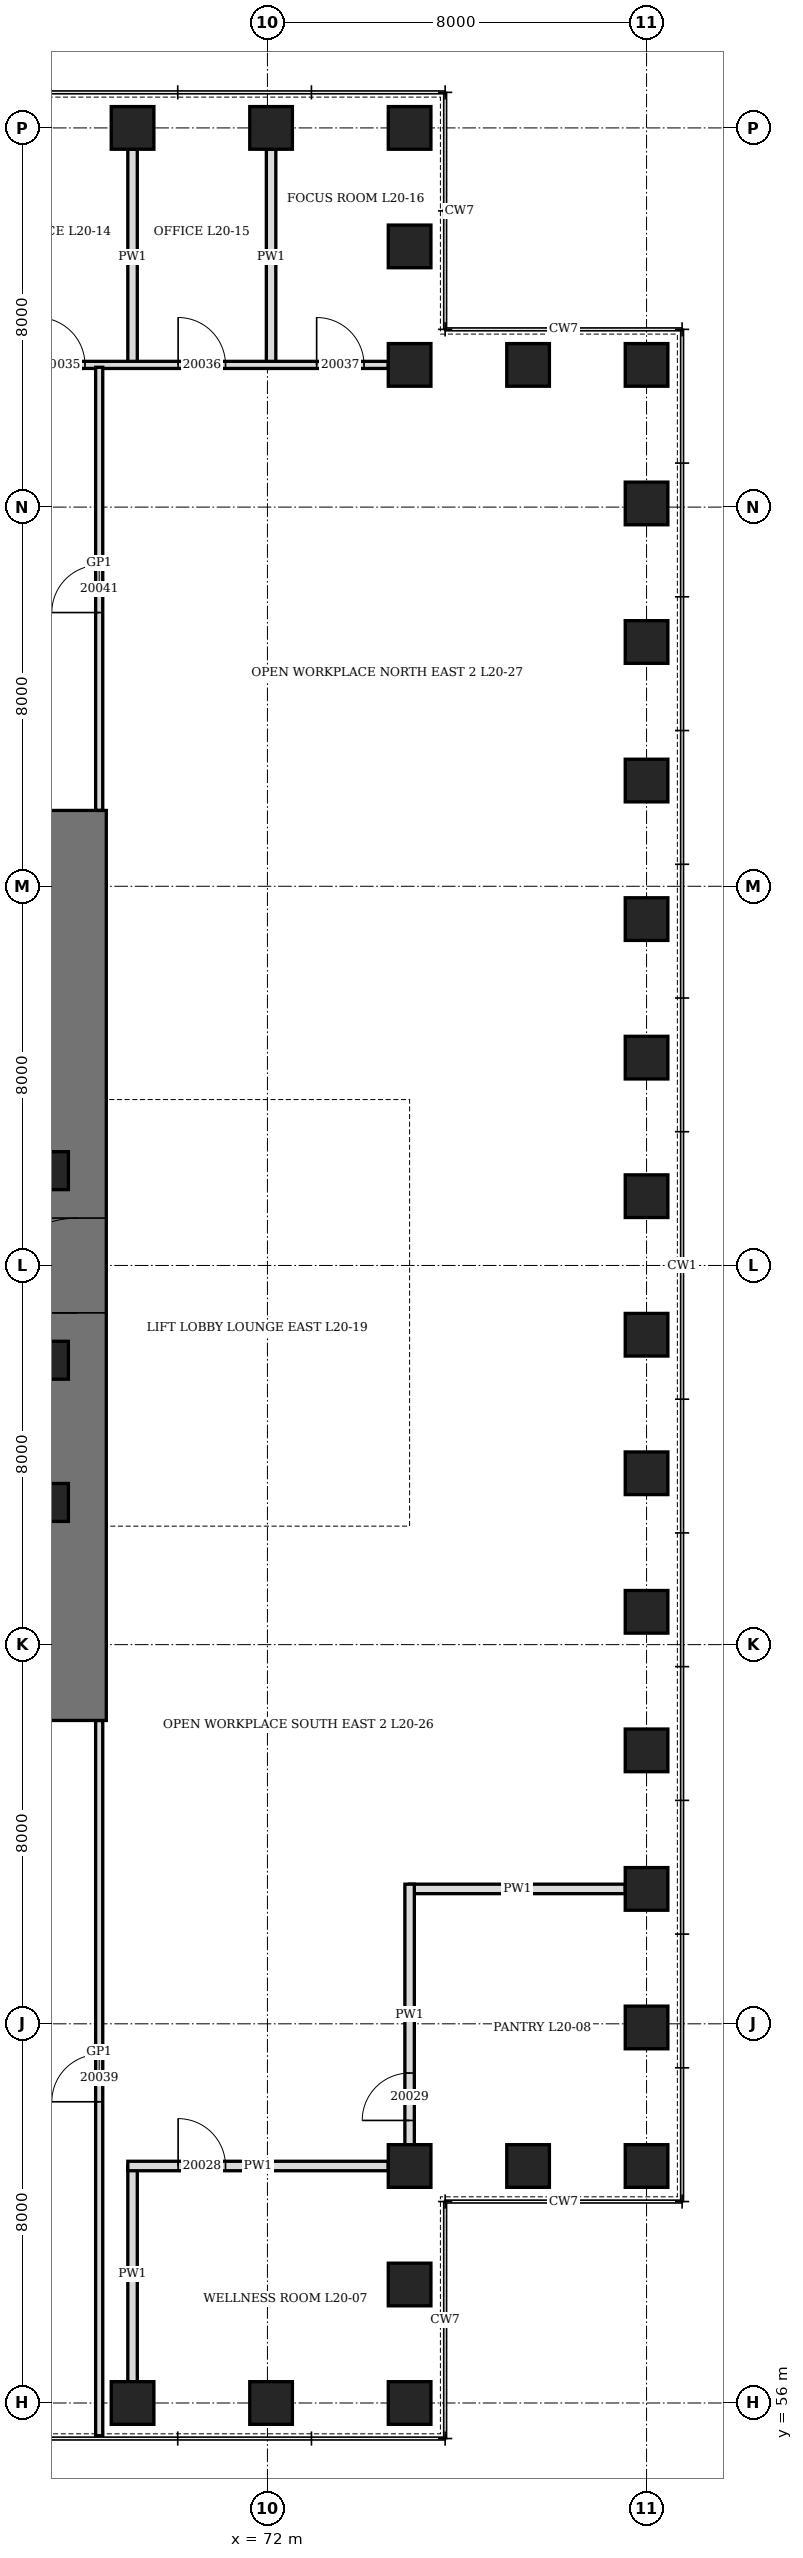
"""IFC4 building model, lengths in metres.
Left out: names, types, materials, properties, quantities, classifications, styles, units other than length and angle.
Written with IfcOpenShell. Run it as: python <this file> out.ifc"""

import sys

from ifc_helpers import new_model, si_unit, direction, frame, frame_2d, origin, origin_2d, place, context, subcontext, project, spatial, rectangle, hollow_rectangle, extrude, element, fill, save


model = new_model("IFC4")
c1 = context("Model", 3, precision=1e-05, world=origin(), true_north=direction((0.0, 1.0)))
c2 = subcontext(c1, "Body", "Model", "MODEL_VIEW")
j1 = project(units=[si_unit("LENGTHUNIT", "METRE"), si_unit("PLANEANGLEUNIT", "RADIAN")], contexts=[c1])
p1 = place(None, origin())
s1 = spatial("IfcSite", under=j1, at=p1, CompositionType="ELEMENT")
p2 = place(p1, origin())
s2 = spatial("IfcBuilding", under=s1, at=p2, CompositionType="ELEMENT")
p3 = place(p2, frame((0.0, 0.0, 93.7)))
s3 = spatial("IfcBuildingStorey", under=s2, at=p3, CompositionType="ELEMENT", Elevation=93.7)
for number, where, z_axis, x_axis in (
    (1, (69.154, 56.0, 0.0), (0.0, 0.0, 1.0), (1.0, 0.0, 0.0)),
    (2, (72.077, 56.0, 0.0), (0.0, 0.0, 1.0), (1.0, 0.0, 0.0)),
    (3, (75.0, 56.0, 0.0), (0.0, 0.0, 1.0), (0.0, 1.0, 0.0)),
    (4, (75.0, 58.5, 0.0), (0.0, 0.0, 1.0), (0.0, 1.0, 0.0)),
    (5, (75.0, 61.0, 0.0), (0.0, 0.0, 1.0), (1.0, 0.0, 0.0)),
    (6, (77.5, 61.0, 0.0), (0.0, 0.0, 1.0), (1.0, 0.0, 0.0)),
    (7, (80.0, 61.0, 0.0), (0.0, 0.0, 1.0), (0.0, 1.0, 0.0)),
    (8, (80.0, 63.923, 0.0), (0.0, 0.0, 1.0), (0.0, 1.0, 0.0)),
    (9, (80.0, 66.846, 0.0), (0.0, 0.0, 1.0), (0.0, 1.0, 0.0)),
    (10, (80.0, 69.769, 0.0), (0.0, 0.0, 1.0), (0.0, 1.0, 0.0)),
    (11, (80.0, 72.692, 0.0), (0.0, 0.0, 1.0), (0.0, 1.0, 0.0)),
    (12, (80.0, 75.615, 0.0), (0.0, 0.0, 1.0), (0.0, 1.0, 0.0)),
    (13, (80.0, 78.539, 0.0), (0.0, 0.0, 1.0), (0.0, 1.0, 0.0)),
    (14, (80.0, 81.461, 0.0), (0.0, 0.0, 1.0), (0.0, 1.0, 0.0)),
    (15, (80.0, 84.385, 0.0), (0.0, 0.0, 1.0), (0.0, 1.0, 0.0)),
    (16, (80.0, 87.308, 0.0), (0.0, 0.0, 1.0), (0.0, 1.0, 0.0)),
    (17, (80.0, 90.231, 0.0), (0.0, 0.0, 1.0), (0.0, 1.0, 0.0)),
    (18, (80.0, 93.154, 0.0), (0.0, 0.0, 1.0), (0.0, 1.0, 0.0)),
    (19, (80.0, 96.077, 0.0), (0.0, 0.0, 1.0), (0.0, 1.0, 0.0)),
    (20, (80.0, 99.0, 0.0), (0.0, 0.0, 1.0), (1.0, 0.0, 0.0)),
    (21, (77.5, 99.0, 0.0), (0.0, 0.0, 1.0), (1.0, 0.0, 0.0)),
    (22, (75.0, 99.0, 0.0), (0.0, 0.0, 1.0), (0.0, 1.0, 0.0)),
    (23, (75.0, 101.5, 0.0), (0.0, 0.0, 1.0), (0.0, 1.0, 0.0)),
    (24, (75.0, 104.0, 0.0), (0.0, 0.0, 1.0), (1.0, 0.0, 0.0)),
    (25, (72.077, 104.0, 0.0), (0.0, 0.0, 1.0), (1.0, 0.0, 0.0)),
    (26, (69.154, 104.0, 0.0), (0.0, 0.0, 1.0), (1.0, 0.0, 0.0)),
):
    element("IfcColumn", number, at=place(p3, frame(where, z_axis=z_axis, x_axis=x_axis)), inside=s3, PredefinedType="COLUMN", context=c2, shape_type="SweptSolid", body=[
        extrude(hollow_rectangle(XDim=0.9, YDim=0.9, WallThickness=0.12, at=origin_2d()), origin(), (0.0, 0.0, 1.0), 4.2),
    ])
p4 = place(p3, frame((68.0, 70.4, 0.0), z_axis=(0.0, 0.0, 1.0), x_axis=(0.0, 1.0, 0.0)))
e27 = element("IfcWall", 27, at=p4, inside=s3, PredefinedType="SHEAR", context=c2, shape_type="SweptSolid", body=[
    extrude(rectangle(XDim=19.2, YDim=1.2, at=frame_2d((9.6, 0.0))), origin(), (0.0, 0.0, 1.0), 4.2),
])
p5 = place(p4, frame((8.6, 0.0, 0.0)))
e28 = element("IfcOpeningElement", 28, at=p5, cuts=e27, PredefinedType="OPENING", context=c2, shape_type="SweptSolid", body=[
    extrude(rectangle(XDim=2.0, YDim=2.4, at=frame_2d((1.0, 1.2))), frame((0.0, 0.61, 0.0), z_axis=(0.0, -1.0, 0.0), x_axis=(1.0, 0.0, 0.0)), (0.0, 0.0, 1.0), 1.22),
])
for number, where, z_axis, x_axis in (
    (29, (67.4, 75.0, 0.0), (0.0, 0.0, 1.0), (1.0, 0.0, 0.0)),
    (30, (67.4, 78.0, 0.0), (0.0, 0.0, 1.0), (1.0, 0.0, 0.0)),
    (31, (67.4, 82.0, 0.0), (0.0, 0.0, 1.0), (1.0, 0.0, 0.0)),
):
    element("IfcColumn", number, at=place(p3, frame(where, z_axis=z_axis, x_axis=x_axis)), inside=s3, PredefinedType="COLUMN", context=c2, shape_type="SweptSolid", body=[
        extrude(hollow_rectangle(XDim=0.8, YDim=0.8, WallThickness=0.1, at=origin_2d()), origin(), (0.0, 0.0, 1.0), 4.2),
    ])
p6 = place(p3, frame((69.154, 56.45, 0.0), z_axis=(0.0, 0.0, 1.0), x_axis=(0.0, 1.0, 0.0)))
e32 = element("IfcWall", 32, at=p6, inside=s3, PredefinedType="PARTITIONING", context=c2, shape_type="SweptSolid", body=[
    extrude(rectangle(XDim=4.55, YDim=0.2, at=frame_2d((2.275, 0.0))), origin(), (0.0, 0.0, 1.0), 3.278),
])
p7 = place(p3, frame((75.0, 66.846, 0.0), z_axis=(0.0, 0.0, 1.0), x_axis=(1.0, 0.0, 0.0)))
e33 = element("IfcWall", 33, at=p7, inside=s3, PredefinedType="PARTITIONING", context=c2, shape_type="SweptSolid", body=[
    extrude(rectangle(XDim=4.55, YDim=0.2, at=frame_2d((2.275, 0.0))), origin(), (0.0, 0.0, 1.0), 3.428),
])
p8 = place(p3, frame((69.154, 99.0, 0.0), z_axis=(0.0, 0.0, 1.0), x_axis=(0.0, 1.0, 0.0)))
e34 = element("IfcWall", 34, at=p8, inside=s3, PredefinedType="PARTITIONING", context=c2, shape_type="SweptSolid", body=[
    extrude(rectangle(XDim=4.55, YDim=0.2, at=frame_2d((2.275, 0.0))), origin(), (0.0, 0.0, 1.0), 3.278),
])
p9 = place(p3, frame((72.077, 99.0, 0.0), z_axis=(0.0, 0.0, 1.0), x_axis=(0.0, 1.0, 0.0)))
e35 = element("IfcWall", 35, at=p9, inside=s3, PredefinedType="PARTITIONING", context=c2, shape_type="SweptSolid", body=[
    extrude(rectangle(XDim=4.55, YDim=0.2, at=frame_2d((2.275, 0.0))), origin(), (0.0, 0.0, 1.0), 3.428),
])
p10 = place(p3, frame((69.054, 61.0, 0.0), z_axis=(0.0, 0.0, 1.0), x_axis=(1.0, 0.0, 0.0)))
e36 = element("IfcWall", 36, at=p10, inside=s3, PredefinedType="PARTITIONING", context=c2, shape_type="SweptSolid", body=[
    extrude(rectangle(XDim=5.496, YDim=0.2, at=frame_2d((2.748, 0.0))), origin(), (0.0, 0.0, 1.0), 4.04),
])
p11 = place(p10, frame((1.062, 0.0, 0.0)))
e37 = element("IfcOpeningElement", 37, at=p11, cuts=e36, PredefinedType="OPENING", context=c2, shape_type="SweptSolid", body=[
    extrude(rectangle(XDim=1.0, YDim=2.1, at=frame_2d((0.5, 1.05))), frame((0.0, 0.11, 0.0), z_axis=(0.0, -1.0, 0.0), x_axis=(1.0, 0.0, 0.0)), (0.0, 0.0, 1.0), 0.22),
])
p12 = place(p3, frame((57.362, 99.0, 0.0), z_axis=(0.0, 0.0, 1.0), x_axis=(1.0, 0.0, 0.0)))
e38 = element("IfcWall", 38, at=p12, inside=s3, PredefinedType="PARTITIONING", context=c2, shape_type="SweptSolid", body=[
    extrude(rectangle(XDim=17.188, YDim=0.15, at=frame_2d((8.594, 0.0))), origin(), (0.0, 0.0, 1.0), 4.04),
])
p13 = place(p12, frame((1.062, 0.0, 0.0)))
e39 = element("IfcOpeningElement", 39, at=p13, cuts=e38, PredefinedType="OPENING", context=c2, shape_type="SweptSolid", body=[
    extrude(rectangle(XDim=1.0, YDim=2.1, at=frame_2d((0.5, 1.05))), frame((0.0, 0.085, 0.0), z_axis=(0.0, -1.0, 0.0), x_axis=(1.0, 0.0, 0.0)), (0.0, 0.0, 1.0), 0.17),
])
p14 = place(p12, frame((3.985, 0.0, 0.0)))
e40 = element("IfcOpeningElement", 40, at=p14, cuts=e38, PredefinedType="OPENING", context=c2, shape_type="SweptSolid", body=[
    extrude(rectangle(XDim=1.0, YDim=2.1, at=frame_2d((0.5, 1.05))), frame((0.0, 0.085, 0.0), z_axis=(0.0, -1.0, 0.0), x_axis=(1.0, 0.0, 0.0)), (0.0, 0.0, 1.0), 0.17),
])
p15 = place(p12, frame((6.908, 0.0, 0.0)))
e41 = element("IfcOpeningElement", 41, at=p15, cuts=e38, PredefinedType="OPENING", context=c2, shape_type="SweptSolid", body=[
    extrude(rectangle(XDim=1.0, YDim=2.1, at=frame_2d((0.5, 1.05))), frame((0.0, 0.085, 0.0), z_axis=(0.0, -1.0, 0.0), x_axis=(1.0, 0.0, 0.0)), (0.0, 0.0, 1.0), 0.17),
])
p16 = place(p12, frame((9.789, 0.0, 0.0)))
e42 = element("IfcOpeningElement", 42, at=p16, cuts=e38, PredefinedType="OPENING", context=c2, shape_type="SweptSolid", body=[
    extrude(rectangle(XDim=1.0, YDim=2.1, at=frame_2d((0.5, 1.05))), frame((0.0, 0.085, 0.0), z_axis=(0.0, -1.0, 0.0), x_axis=(1.0, 0.0, 0.0)), (0.0, 0.0, 1.0), 0.17),
])
p17 = place(p12, frame((12.754, 0.0, 0.0)))
e43 = element("IfcOpeningElement", 43, at=p17, cuts=e38, PredefinedType="OPENING", context=c2, shape_type="SweptSolid", body=[
    extrude(rectangle(XDim=1.0, YDim=2.1, at=frame_2d((0.5, 1.05))), frame((0.0, 0.085, 0.0), z_axis=(0.0, -1.0, 0.0), x_axis=(1.0, 0.0, 0.0)), (0.0, 0.0, 1.0), 0.17),
])
p18 = place(p12, frame((15.677, 0.0, 0.0)))
e44 = element("IfcOpeningElement", 44, at=p18, cuts=e38, PredefinedType="OPENING", context=c2, shape_type="SweptSolid", body=[
    extrude(rectangle(XDim=1.0, YDim=2.4, at=frame_2d((0.5, 1.2))), frame((0.0, 0.085, 0.0), z_axis=(0.0, -1.0, 0.0), x_axis=(1.0, 0.0, 0.0)), (0.0, 0.0, 1.0), 0.17),
])
p19 = place(p3, frame((68.45, 55.31, 0.0), z_axis=(0.0, 0.0, 1.0), x_axis=(0.0, 1.0, 0.0)))
e45 = element("IfcWall", 45, at=p19, inside=s3, PredefinedType="PARTITIONING", context=c2, shape_type="SweptSolid", body=[
    extrude(rectangle(XDim=15.09, YDim=0.15, at=frame_2d((7.545, 0.0))), origin(), (0.0, 0.0, 1.0), 4.04),
])
p20 = place(p19, frame((7.045, 0.0, 0.0)))
e46 = element("IfcOpeningElement", 46, at=p20, cuts=e45, PredefinedType="OPENING", context=c2, shape_type="SweptSolid", body=[
    extrude(rectangle(XDim=1.0, YDim=2.4, at=frame_2d((0.5, 1.2))), frame((0.0, 0.085, 0.0), z_axis=(0.0, -1.0, 0.0), x_axis=(1.0, 0.0, 0.0)), (0.0, 0.0, 1.0), 0.17),
])
p21 = place(p3, frame((68.45, 89.6, 0.0), z_axis=(0.0, 0.0, 1.0), x_axis=(0.0, 1.0, 0.0)))
e47 = element("IfcWall", 47, at=p21, inside=s3, PredefinedType="PARTITIONING", context=c2, shape_type="SweptSolid", body=[
    extrude(rectangle(XDim=9.35, YDim=0.15, at=frame_2d((4.675, 0.0))), origin(), (0.0, 0.0, 1.0), 4.04),
])
p22 = place(p21, frame((4.175, 0.0, 0.0)))
e48 = element("IfcOpeningElement", 48, at=p22, cuts=e47, PredefinedType="OPENING", context=c2, shape_type="SweptSolid", body=[
    extrude(rectangle(XDim=1.0, YDim=2.4, at=frame_2d((0.5, 1.2))), frame((0.0, 0.085, 0.0), z_axis=(0.0, -1.0, 0.0), x_axis=(1.0, 0.0, 0.0)), (0.0, 0.0, 1.0), 0.17),
])
p23 = place(p3, frame((75.0, 61.45, 0.0), z_axis=(0.0, 0.0, 1.0), x_axis=(0.0, 1.0, 0.0)))
e49 = element("IfcWall", 49, at=p23, inside=s3, PredefinedType="PARTITIONING", context=c2, shape_type="SweptSolid", body=[
    extrude(rectangle(XDim=5.496, YDim=0.2, at=frame_2d((2.748, 0.0))), origin(), (0.0, 0.0, 1.0), 4.04),
])
p24 = place(p23, frame((0.511, 0.0, 0.0)))
e50 = element("IfcOpeningElement", 50, at=p24, cuts=e49, PredefinedType="OPENING", context=c2, shape_type="SweptSolid", body=[
    extrude(rectangle(XDim=1.0, YDim=2.1, at=frame_2d((0.5, 1.05))), frame((0.0, 0.11, 0.0), z_axis=(0.0, -1.0, 0.0), x_axis=(1.0, 0.0, 0.0)), (0.0, 0.0, 1.0), 0.22),
])
p25 = place(p5, origin())
e51 = element("IfcDoor", 51, at=p25, inside=s3, OperationType="DOUBLE_DOOR_SINGLE_SWING", PredefinedType="DOOR", context=c2, shape_type="SweptSolid", body=[
    extrude(rectangle(XDim=2.0, YDim=2.4, at=frame_2d((1.0, 1.2))), frame((0.0, 0.35, 0.0), z_axis=(0.0, -1.0, 0.0), x_axis=(1.0, 0.0, 0.0)), (0.0, 0.0, 1.0), 0.7),
])
fill(e28, e51)
p26 = place(p11, origin())
e52 = element("IfcDoor", 52, at=p26, inside=s3, OperationType="SINGLE_SWING_LEFT", PredefinedType="DOOR", context=c2, shape_type="SweptSolid", body=[
    extrude(rectangle(XDim=1.0, YDim=2.1, at=frame_2d((0.5, 1.05))), frame((0.0, 0.1, 0.0), z_axis=(0.0, -1.0, 0.0), x_axis=(1.0, 0.0, 0.0)), (0.0, 0.0, 1.0), 0.199),
])
fill(e37, e52)
p27 = place(p24, origin())
e53 = element("IfcDoor", 53, at=p27, inside=s3, OperationType="SINGLE_SWING_LEFT", PredefinedType="DOOR", context=c2, shape_type="SweptSolid", body=[
    extrude(rectangle(XDim=1.0, YDim=2.1, at=frame_2d((0.5, 1.05))), frame((0.0, 0.1, 0.0), z_axis=(0.0, -1.0, 0.0), x_axis=(1.0, 0.0, 0.0)), (0.0, 0.0, 1.0), 0.199),
])
fill(e50, e53)
p28 = place(p16, origin())
e54 = element("IfcDoor", 54, at=p28, inside=s3, OperationType="SINGLE_SWING_LEFT", PredefinedType="DOOR", context=c2, shape_type="SweptSolid", body=[
    extrude(rectangle(XDim=1.0, YDim=2.1, at=frame_2d((0.5, 1.05))), frame((0.0, 0.075, 0.0), z_axis=(0.0, -1.0, 0.0), x_axis=(1.0, 0.0, 0.0)), (0.0, 0.0, 1.0), 0.149),
])
fill(e42, e54)
p29 = place(p17, origin())
e55 = element("IfcDoor", 55, at=p29, inside=s3, OperationType="SINGLE_SWING_LEFT", PredefinedType="DOOR", context=c2, shape_type="SweptSolid", body=[
    extrude(rectangle(XDim=1.0, YDim=2.1, at=frame_2d((0.5, 1.05))), frame((0.0, 0.075, 0.0), z_axis=(0.0, -1.0, 0.0), x_axis=(1.0, 0.0, 0.0)), (0.0, 0.0, 1.0), 0.149),
])
fill(e43, e55)
p30 = place(p18, origin())
e56 = element("IfcDoor", 56, at=p30, inside=s3, OperationType="SINGLE_SWING_RIGHT", PredefinedType="DOOR", context=c2, shape_type="SweptSolid", body=[
    extrude(rectangle(XDim=1.0, YDim=2.4, at=frame_2d((0.5, 1.2))), frame((0.0, 0.075, 0.0), z_axis=(0.0, -1.0, 0.0), x_axis=(1.0, 0.0, 0.0)), (0.0, 0.0, 1.0), 0.149),
])
fill(e44, e56)
p31 = place(p20, origin())
e57 = element("IfcDoor", 57, at=p31, inside=s3, OperationType="SINGLE_SWING_RIGHT", PredefinedType="DOOR", context=c2, shape_type="SweptSolid", body=[
    extrude(rectangle(XDim=1.0, YDim=2.4, at=frame_2d((0.5, 1.2))), frame((0.0, 0.075, 0.0), z_axis=(0.0, -1.0, 0.0), x_axis=(1.0, 0.0, 0.0)), (0.0, 0.0, 1.0), 0.149),
])
fill(e46, e57)
p32 = place(p22, origin())
e58 = element("IfcDoor", 58, at=p32, inside=s3, OperationType="SINGLE_SWING_RIGHT", PredefinedType="DOOR", context=c2, shape_type="SweptSolid", body=[
    extrude(rectangle(XDim=1.0, YDim=2.4, at=frame_2d((0.5, 1.2))), frame((0.0, 0.075, 0.0), z_axis=(0.0, -1.0, 0.0), x_axis=(1.0, 0.0, 0.0)), (0.0, 0.0, 1.0), 0.149),
])
fill(e48, e58)
save(model, sys.argv[1])
